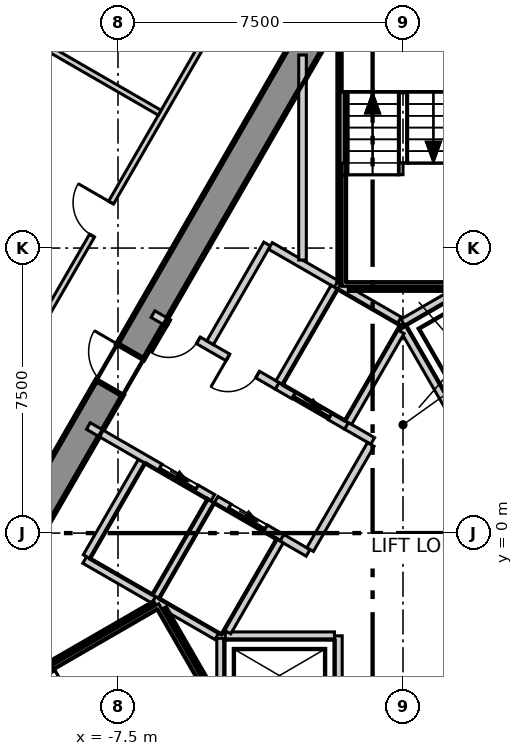
"""IFC4 building model, lengths in metres.
Left out: names, types, materials, properties, quantities, classifications, styles, units other than length and angle.
Written with IfcOpenShell. Run it as: python <this file> out.ifc"""

import sys

from ifc_helpers import new_model, si_unit, direction, frame, frame_2d, origin, place, context, subcontext, project, spatial, polyline, rectangle, outline, extrude, element, fill, save


model = new_model("IFC4")
c1 = context("Model", 3, precision=1e-05, world=origin(), true_north=direction((0.0, 1.0)))
c2 = subcontext(c1, "Body", "Model", "MODEL_VIEW")
j1 = project(units=[si_unit("LENGTHUNIT", "METRE"), si_unit("PLANEANGLEUNIT", "RADIAN")], contexts=[c1])
p1 = place(None, origin())
s1 = spatial("IfcSite", under=j1, at=p1, CompositionType="ELEMENT")
p2 = place(p1, origin())
s2 = spatial("IfcBuilding", under=s1, at=p2, CompositionType="ELEMENT")
p3 = place(p2, frame((0.0, 0.0, 176.3)))
s3 = spatial("IfcBuildingStorey", under=s2, at=p3, CompositionType="ELEMENT", Elevation=176.3)
p4 = place(p3, frame((-1.674, 14.3, -0.3), z_axis=(0.0, 0.0, 1.0), x_axis=(-0.499995765644, -0.866027848477, 0.0)))
e1 = element("IfcWall", 1, at=p4, inside=s3, PredefinedType="SHEAR", context=c2, shape_type="SweptSolid", body=[
    extrude(outline(polyline([(-0.231, -0.4), (1.732, -0.4), (3.695, -0.4), (5.658, -0.4), (7.621, -0.4), (9.584, -0.4), (11.547, -0.4), (13.51, -0.4), (15.473, -0.4), (17.436, -0.4), (19.399, -0.4), (21.362, -0.4), (23.325, -0.4), (22.863, 0.4), (20.977, 0.4), (19.091, 0.4), (17.205, 0.4), (15.319, 0.4), (13.433, 0.4), (11.547, 0.4), (9.661, 0.4), (7.775, 0.4), (5.889, 0.4), (4.003, 0.4), (2.117, 0.4), (0.231, 0.4), (-0.231, -0.4)])), origin(), (0.0, 0.0, 1.0), 4.2),
])
p5 = place(p4, frame((10.997, 0.0, 0.3)))
e2 = element("IfcOpeningElement", 2, at=p5, cuts=e1, PredefinedType="OPENING", context=c2, shape_type="SweptSolid", body=[
    extrude(rectangle(XDim=1.1, YDim=2.1, at=frame_2d((0.55, 1.05))), frame((0.0, 0.41, 0.0), z_axis=(0.0, -1.0, 0.0), x_axis=(1.0, 0.0, 0.0)), (0.0, 0.0, 1.0), 0.82),
])
p6 = place(p3, frame((-2.926, 32.654, 0.0), z_axis=(0.0, 0.0, 1.0), x_axis=(-0.499994049952, -0.866028839019, 0.0)))
e3 = element("IfcWall", 3, at=p6, inside=s3, PredefinedType="ELEMENTEDWALL", context=c2, shape_type="SweptSolid", body=[
    extrude(rectangle(XDim=53.613, YDim=0.2, at=frame_2d((26.806, 0.0))), origin(), (0.0, 0.0, 1.0), 3.9),
])
p7 = place(p6, frame((2.042, 0.0, 0.9)))
e4 = element("IfcOpeningElement", 4, at=p7, cuts=e3, PredefinedType="OPENING", context=c2, shape_type="SweptSolid", body=[
    extrude(rectangle(XDim=4.9, YDim=2.5, at=frame_2d((2.45, 1.25))), frame((0.0, 0.11, 0.0), z_axis=(0.0, -1.0, 0.0), x_axis=(1.0, 0.0, 0.0)), (0.0, 0.0, 1.0), 0.22),
])
p8 = place(p6, frame((8.42, 0.0, 0.9)))
e5 = element("IfcOpeningElement", 5, at=p8, cuts=e3, PredefinedType="OPENING", context=c2, shape_type="SweptSolid", body=[
    extrude(rectangle(XDim=4.9, YDim=2.5, at=frame_2d((2.45, 1.25))), frame((0.0, 0.11, 0.0), z_axis=(0.0, -1.0, 0.0), x_axis=(1.0, 0.0, 0.0)), (0.0, 0.0, 1.0), 0.22),
])
p9 = place(p6, frame((14.798, 0.0, 0.9)))
e6 = element("IfcOpeningElement", 6, at=p9, cuts=e3, PredefinedType="OPENING", context=c2, shape_type="SweptSolid", body=[
    extrude(rectangle(XDim=4.9, YDim=2.5, at=frame_2d((2.45, 1.25))), frame((0.0, 0.11, 0.0), z_axis=(0.0, -1.0, 0.0), x_axis=(1.0, 0.0, 0.0)), (0.0, 0.0, 1.0), 0.22),
])
p10 = place(p6, frame((21.177, 0.0, 0.9)))
e7 = element("IfcOpeningElement", 7, at=p10, cuts=e3, PredefinedType="OPENING", context=c2, shape_type="SweptSolid", body=[
    extrude(rectangle(XDim=4.9, YDim=2.5, at=frame_2d((2.45, 1.25))), frame((0.0, 0.11, 0.0), z_axis=(0.0, -1.0, 0.0), x_axis=(1.0, 0.0, 0.0)), (0.0, 0.0, 1.0), 0.22),
])
p11 = place(p6, frame((27.555, 0.0, 0.9)))
e8 = element("IfcOpeningElement", 8, at=p11, cuts=e3, PredefinedType="OPENING", context=c2, shape_type="SweptSolid", body=[
    extrude(rectangle(XDim=4.9, YDim=2.5, at=frame_2d((2.45, 1.25))), frame((0.0, 0.11, 0.0), z_axis=(0.0, -1.0, 0.0), x_axis=(1.0, 0.0, 0.0)), (0.0, 0.0, 1.0), 0.22),
])
p12 = place(p6, frame((33.934, 0.0, 0.9)))
e9 = element("IfcOpeningElement", 9, at=p12, cuts=e3, PredefinedType="OPENING", context=c2, shape_type="SweptSolid", body=[
    extrude(rectangle(XDim=4.9, YDim=2.5, at=frame_2d((2.45, 1.25))), frame((0.0, 0.11, 0.0), z_axis=(0.0, -1.0, 0.0), x_axis=(1.0, 0.0, 0.0)), (0.0, 0.0, 1.0), 0.22),
])
p13 = place(p6, frame((40.312, 0.0, 0.9)))
e10 = element("IfcOpeningElement", 10, at=p13, cuts=e3, PredefinedType="OPENING", context=c2, shape_type="SweptSolid", body=[
    extrude(rectangle(XDim=4.9, YDim=2.5, at=frame_2d((2.45, 1.25))), frame((0.0, 0.11, 0.0), z_axis=(0.0, -1.0, 0.0), x_axis=(1.0, 0.0, 0.0)), (0.0, 0.0, 1.0), 0.22),
])
p14 = place(p6, frame((46.69, 0.0, 0.9)))
e11 = element("IfcOpeningElement", 11, at=p14, cuts=e3, PredefinedType="OPENING", context=c2, shape_type="SweptSolid", body=[
    extrude(rectangle(XDim=4.9, YDim=2.5, at=frame_2d((2.45, 1.25))), frame((0.0, 0.11, 0.0), z_axis=(0.0, -1.0, 0.0), x_axis=(1.0, 0.0, 0.0)), (0.0, 0.0, 1.0), 0.22),
])
p15 = place(p3, frame((-15.993, -5.7, 0.0), z_axis=(0.0, 0.0, 1.0), x_axis=(0.500007877715, 0.866020855536, 0.0)))
e12 = element("IfcWall", 12, at=p15, inside=s3, PredefinedType="PARTITIONING", context=c2, shape_type="SweptSolid", body=[
    extrude(rectangle(XDim=25.865, YDim=0.15, at=frame_2d((12.933, 0.0))), origin(), (0.0, 0.0, 1.0), 3.9),
])
p16 = place(p15, frame((21.988, 0.0, 0.0)))
e13 = element("IfcOpeningElement", 13, at=p16, cuts=e12, PredefinedType="OPENING", context=c2, shape_type="SweptSolid", body=[
    extrude(rectangle(XDim=1.2, YDim=2.1, at=frame_2d((0.6, 1.05))), frame((0.0, 0.085, 0.0), z_axis=(0.0, -1.0, 0.0), x_axis=(1.0, 0.0, 0.0)), (0.0, 0.0, 1.0), 0.17),
])
p17 = place(p15, frame((15.622, 0.0, 0.0)))
e14 = element("IfcOpeningElement", 14, at=p17, cuts=e12, PredefinedType="OPENING", context=c2, shape_type="SweptSolid", body=[
    extrude(rectangle(XDim=1.0, YDim=2.1, at=frame_2d((0.5, 1.05))), frame((0.0, 0.085, 0.0), z_axis=(0.0, -1.0, 0.0), x_axis=(1.0, 0.0, 0.0)), (0.0, 0.0, 1.0), 0.17),
])
p18 = place(p15, frame((9.244, 0.0, 0.0)))
e15 = element("IfcOpeningElement", 15, at=p18, cuts=e12, PredefinedType="OPENING", context=c2, shape_type="SweptSolid", body=[
    extrude(rectangle(XDim=1.0, YDim=2.1, at=frame_2d((0.5, 1.05))), frame((0.0, 0.085, 0.0), z_axis=(0.0, -1.0, 0.0), x_axis=(1.0, 0.0, 0.0)), (0.0, 0.0, 1.0), 0.17),
])
p19 = place(p15, frame((2.678, 0.0, 0.0)))
e16 = element("IfcOpeningElement", 16, at=p19, cuts=e12, PredefinedType="OPENING", context=c2, shape_type="SweptSolid", body=[
    extrude(rectangle(XDim=1.2, YDim=2.1, at=frame_2d((0.6, 1.05))), frame((0.0, 0.085, 0.0), z_axis=(0.0, -1.0, 0.0), x_axis=(1.0, 0.0, 0.0)), (0.0, 0.0, 1.0), 0.17),
])
p20 = place(p3, frame((-13.145, 14.954, 0.0), z_axis=(0.0, 0.0, 1.0), x_axis=(0.866023191782, -0.500003831281, 0.0)))
e17 = element("IfcWall", 17, at=p20, inside=s3, PredefinedType="PARTITIONING", context=c2, shape_type="SweptSolid", body=[
    extrude(rectangle(XDim=7.786, YDim=0.15, at=frame_2d((3.893, 0.0))), origin(), (0.0, 0.0, 1.0), 3.9),
])
p21 = place(p3, frame((-8.376, -0.707, 0.0), z_axis=(0.0, 0.0, 1.0), x_axis=(0.866067520717, -0.499927044236, 0.0)))
e18 = element("IfcWall", 18, at=p21, inside=s3, PredefinedType="SOLIDWALL", context=c2, shape_type="SweptSolid", body=[
    extrude(rectangle(XDim=2.1, YDim=0.2, at=frame_2d((1.05, 0.0))), origin(), (0.0, 0.0, 1.0), 3.9),
])
p22 = place(p3, frame((-8.326, -0.62, 0.0), z_axis=(0.0, 0.0, 1.0), x_axis=(0.500023687443, 0.866011727401, 0.0)))
e19 = element("IfcWall", 19, at=p22, inside=s3, PredefinedType="SOLIDWALL", context=c2, shape_type="SweptSolid", body=[
    extrude(rectangle(XDim=2.9, YDim=0.2, at=frame_2d((1.45, 0.0))), origin(), (0.0, 0.0, 1.0), 3.9),
])
p23 = place(p3, frame((-4.8, -6.9, 0.0), z_axis=(0.0, 0.0, 1.0), x_axis=(0.0, 1.0, 0.0)))
e20 = element("IfcWall", 20, at=p23, inside=s3, PredefinedType="SOLIDWALL", context=c2, shape_type="SweptSolid", body=[
    extrude(rectangle(XDim=4.131, YDim=0.2, at=frame_2d((2.065, 0.0))), origin(), (0.0, 0.0, 1.0), 3.9),
])
p24 = place(p3, frame((-1.7, -8.58, 0.0), z_axis=(0.0, 0.0, 1.0), x_axis=(0.0, 1.0, 0.0)))
e21 = element("IfcWall", 21, at=p24, inside=s3, PredefinedType="SOLIDWALL", context=c2, shape_type="SweptSolid", body=[
    extrude(rectangle(XDim=5.877, YDim=0.2, at=frame_2d((2.938, 0.0))), origin(), (0.0, 0.0, 1.0), 3.9),
])
p25 = place(p24, frame((0.38, 0.0, 0.0)))
e22 = element("IfcOpeningElement", 22, at=p25, cuts=e21, PredefinedType="OPENING", context=c2, shape_type="SweptSolid", body=[
    extrude(rectangle(XDim=0.9, YDim=2.1, at=frame_2d((0.45, 1.05))), frame((0.0, 0.11, 0.0), z_axis=(0.0, -1.0, 0.0), x_axis=(1.0, 0.0, 0.0)), (0.0, 0.0, 1.0), 0.22),
])
p26 = place(p3, frame((-4.676, -2.7, 0.0), z_axis=(0.0, 0.0, 1.0), x_axis=(1.0, 0.0, 0.0)))
e23 = element("IfcWall", 23, at=p26, inside=s3, PredefinedType="SOLIDWALL", context=c2, shape_type="SweptSolid", body=[
    extrude(rectangle(XDim=2.873, YDim=0.2, at=frame_2d((1.437, 0.0))), origin(), (0.0, 0.0, 1.0), 3.9),
])
p27 = place(p3, frame((-0.002, 5.542, 0.0), z_axis=(0.0, 0.0, 1.0), x_axis=(0.866103910842, 0.499863997127, 0.0)))
e24 = element("IfcWall", 24, at=p27, inside=s3, PredefinedType="SOLIDWALL", context=c2, shape_type="SweptSolid", body=[
    extrude(rectangle(XDim=4.131, YDim=0.2, at=frame_2d((2.065, 0.0))), origin(), (0.0, 0.0, 1.0), 3.9),
])
p28 = place(p3, frame((0.0, 5.4, 0.0), z_axis=(0.0, 0.0, 1.0), x_axis=(0.500103862429, -0.865965430478, 0.0)))
e25 = element("IfcWall", 25, at=p28, inside=s3, PredefinedType="SOLIDWALL", context=c2, shape_type="SweptSolid", body=[
    extrude(rectangle(XDim=2.973, YDim=0.2, at=frame_2d((1.487, 0.0))), origin(), (0.0, 0.0, 1.0), 3.9),
])
p29 = place(p3, frame((-8.28, 2.818, 0.0), z_axis=(0.0, 0.0, 1.0), x_axis=(0.86600175068, -0.50004096614, 0.0)))
e26 = element("IfcWall", 26, at=p29, inside=s3, PredefinedType="SOLIDWALL", context=c2, shape_type="SweptSolid", body=[
    extrude(rectangle(XDim=3.782, YDim=0.2, at=frame_2d((1.891, 0.0))), origin(), (0.0, 0.0, 1.0), 3.9),
])
p30 = place(p29, frame((2.18, 0.0, 0.0)))
e27 = element("IfcOpeningElement", 27, at=p30, cuts=e26, PredefinedType="OPENING", context=c2, shape_type="SweptSolid", body=[
    extrude(rectangle(XDim=1.1, YDim=2.1, at=frame_2d((0.55, 1.05))), frame((0.0, 0.11, 0.0), z_axis=(0.0, -1.0, 0.0), x_axis=(1.0, 0.0, 0.0)), (0.0, 0.0, 1.0), 0.22),
])
p31 = place(p3, frame((-3.188, -0.122, 0.0), z_axis=(0.0, 0.0, 1.0), x_axis=(0.865705793592, -0.50055317294, 0.0)))
e28 = element("IfcWall", 28, at=p31, inside=s3, PredefinedType="SOLIDWALL", context=c2, shape_type="SweptSolid", body=[
    extrude(rectangle(XDim=0.797, YDim=0.2, at=frame_2d((0.398, 0.0))), origin(), (0.0, 0.0, 1.0), 3.9),
])
p32 = place(p3, frame((-6.58, 5.762, 0.0), z_axis=(0.0, 0.0, 1.0), x_axis=(0.866029704776, -0.49999255039, 0.0)))
e29 = element("IfcWall", 29, at=p32, inside=s3, PredefinedType="SOLIDWALL", context=c2, shape_type="SweptSolid", body=[
    extrude(rectangle(XDim=3.782, YDim=0.2, at=frame_2d((1.891, 0.0))), origin(), (0.0, 0.0, 1.0), 3.9),
])
p33 = place(p32, frame((2.279, 0.0, 0.0)))
e30 = element("IfcOpeningElement", 30, at=p33, cuts=e29, PredefinedType="OPENING", context=c2, shape_type="SweptSolid", body=[
    extrude(rectangle(XDim=0.9, YDim=2.1, at=frame_2d((0.45, 1.05))), frame((0.0, 0.11, 0.0), z_axis=(0.0, -1.0, 0.0), x_axis=(1.0, 0.0, 0.0)), (0.0, 0.0, 1.0), 0.22),
])
p34 = place(p32, frame((0.479, 0.0, 0.0)))
e31 = element("IfcOpeningElement", 31, at=p34, cuts=e29, PredefinedType="OPENING", context=c2, shape_type="SweptSolid", body=[
    extrude(rectangle(XDim=0.9, YDim=2.1, at=frame_2d((0.45, 1.05))), frame((0.0, 0.11, 0.0), z_axis=(0.0, -1.0, 0.0), x_axis=(1.0, 0.0, 0.0)), (0.0, 0.0, 1.0), 0.22),
])
p35 = place(p3, frame((-1.488, 2.822, 0.0), z_axis=(0.0, 0.0, 1.0), x_axis=(0.866236612152, -0.499633997809, 0.0)))
e32 = element("IfcWall", 32, at=p35, inside=s3, PredefinedType="SOLIDWALL", context=c2, shape_type="SweptSolid", body=[
    extrude(rectangle(XDim=0.796, YDim=0.2, at=frame_2d((0.398, 0.0))), origin(), (0.0, 0.0, 1.0), 3.9),
])
p36 = place(p3, frame((-5.076, 5.009, 0.0), z_axis=(0.0, 0.0, 1.0), x_axis=(0.50002537861, 0.866010750942, 0.0)))
e33 = element("IfcWall", 33, at=p36, inside=s3, PredefinedType="SOLIDWALL", context=c2, shape_type="SweptSolid", body=[
    extrude(rectangle(XDim=3.0, YDim=0.2, at=frame_2d((1.5, 0.0))), origin(), (0.0, 0.0, 1.0), 3.9),
])
p37 = place(p3, frame((-3.489, 7.557, 0.0), z_axis=(0.0, 0.0, 1.0), x_axis=(0.866010750942, -0.50002537861, 0.0)))
e34 = element("IfcWall", 34, at=p37, inside=s3, PredefinedType="SOLIDWALL", context=c2, shape_type="SweptSolid", body=[
    extrude(rectangle(XDim=2.0, YDim=0.2, at=frame_2d((1.0, 0.0))), origin(), (0.0, 0.0, 1.0), 3.9),
])
p38 = place(p3, frame((-2.444, -0.433, 0.0), z_axis=(0.0, 0.0, 1.0), x_axis=(0.500035624827, 0.866004834804, 0.0)))
e35 = element("IfcWall", 35, at=p38, inside=s3, PredefinedType="SOLIDWALL", context=c2, shape_type="SweptSolid", body=[
    extrude(rectangle(XDim=3.194, YDim=0.2, at=frame_2d((1.597, 0.0))), origin(), (0.0, 0.0, 1.0), 3.9),
])
p39 = place(p3, frame((-6.557, -1.757, 0.0), z_axis=(0.0, 0.0, 1.0), x_axis=(0.8659754619, -0.500086491905, 0.0)))
e36 = element("IfcWall", 36, at=p39, inside=s3, PredefinedType="SOLIDWALL", context=c2, shape_type="SweptSolid", body=[
    extrude(rectangle(XDim=1.916, YDim=0.2, at=frame_2d((0.958, 0.0))), origin(), (0.0, 0.0, 1.0), 3.9),
])
p40 = place(p3, frame((-6.507, -1.67, 0.0), z_axis=(0.0, 0.0, 1.0), x_axis=(0.50012328804, 0.865954211699, 0.0)))
e37 = element("IfcWall", 37, at=p40, inside=s3, PredefinedType="SOLIDWALL", context=c2, shape_type="SweptSolid", body=[
    extrude(rectangle(XDim=2.9, YDim=0.2, at=frame_2d((1.45, 0.0))), origin(), (0.0, 0.0, 1.0), 3.9),
])
p41 = place(p3, frame((-4.92, 0.878, 0.0), z_axis=(0.0, 0.0, 1.0), x_axis=(0.866010750942, -0.50002537861, 0.0)))
e38 = element("IfcWall", 38, at=p41, inside=s3, PredefinedType="SOLIDWALL", context=c2, shape_type="SweptSolid", body=[
    extrude(rectangle(XDim=2.0, YDim=0.2, at=frame_2d((1.0, 0.0))), origin(), (0.0, 0.0, 1.0), 3.9),
])
p42 = place(p41, frame((0.4, 0.0, 0.0)))
e39 = element("IfcOpeningElement", 39, at=p42, cuts=e38, PredefinedType="OPENING", context=c2, shape_type="SweptSolid", body=[
    extrude(rectangle(XDim=1.1, YDim=2.1, at=frame_2d((0.55, 1.05))), frame((0.0, 0.11, 0.0), z_axis=(0.0, -1.0, 0.0), x_axis=(1.0, 0.0, 0.0)), (0.0, 0.0, 1.0), 0.22),
])
p43 = place(p3, frame((-4.619, -2.6, 0.0), z_axis=(0.0, 0.0, 1.0), x_axis=(0.50009492287, 0.865970593103, 0.0)))
e40 = element("IfcWall", 40, at=p43, inside=s3, PredefinedType="SOLIDWALL", context=c2, shape_type="SweptSolid", body=[
    extrude(rectangle(XDim=2.761, YDim=0.2, at=frame_2d((1.381, 0.0))), origin(), (0.0, 0.0, 1.0), 3.9),
])
p44 = place(p3, frame((-3.309, 3.873, 0.0), z_axis=(0.0, 0.0, 1.0), x_axis=(0.866098583652, -0.499873227325, 0.0)))
e41 = element("IfcWall", 41, at=p44, inside=s3, PredefinedType="SOLIDWALL", context=c2, shape_type="SweptSolid", body=[
    extrude(rectangle(XDim=2.103, YDim=0.2, at=frame_2d((1.051, 0.0))), origin(), (0.0, 0.0, 1.0), 3.9),
])
p45 = place(p44, frame((0.502, 0.0, 0.0)))
e42 = element("IfcOpeningElement", 42, at=p45, cuts=e41, PredefinedType="OPENING", context=c2, shape_type="SweptSolid", body=[
    extrude(rectangle(XDim=1.1, YDim=2.1, at=frame_2d((0.55, 1.05))), frame((0.0, 0.11, 0.0), z_axis=(0.0, -1.0, 0.0), x_axis=(1.0, 0.0, 0.0)), (0.0, 0.0, 1.0), 0.22),
])
p46 = place(p3, frame((-3.257, 3.959, 0.0), z_axis=(0.0, 0.0, 1.0), x_axis=(0.50012328804, 0.865954211699, 0.0)))
e43 = element("IfcWall", 43, at=p46, inside=s3, PredefinedType="SOLIDWALL", context=c2, shape_type="SweptSolid", body=[
    extrude(rectangle(XDim=2.9, YDim=0.2, at=frame_2d((1.45, 0.0))), origin(), (0.0, 0.0, 1.0), 3.9),
])
p47 = place(p3, frame((-1.67, 6.507, 0.0), z_axis=(0.0, 0.0, 1.0), x_axis=(0.865941441609, -0.500145398563, 0.0)))
e44 = element("IfcWall", 44, at=p47, inside=s3, PredefinedType="SOLIDWALL", context=c2, shape_type="SweptSolid", body=[
    extrude(rectangle(XDim=1.815, YDim=0.2, at=frame_2d((0.908, 0.0))), origin(), (0.0, 0.0, 1.0), 3.9),
])
p48 = place(p3, frame((-1.438, 2.909, 0.0), z_axis=(0.0, 0.0, 1.0), x_axis=(0.499829630636, 0.866123744241, 0.0)))
e45 = element("IfcWall", 45, at=p48, inside=s3, PredefinedType="SOLIDWALL", context=c2, shape_type="SweptSolid", body=[
    extrude(rectangle(XDim=2.761, YDim=0.2, at=frame_2d((1.38, 0.0))), origin(), (0.0, 0.0, 1.0), 3.9),
])
p49 = place(p3, frame((-2.644, 7.185, 0.0), z_axis=(0.0, 0.0, 1.0), x_axis=(0.0, 1.0, 0.0)))
e46 = element("IfcWall", 46, at=p49, inside=s3, PredefinedType="SOLIDWALL", context=c2, shape_type="SweptSolid", body=[
    extrude(rectangle(XDim=5.395, YDim=0.2, at=frame_2d((2.698, 0.0))), origin(), (0.0, 0.0, 1.0), 3.35),
])
p50 = place(p3, frame((-13.167, -5.754, 0.0), z_axis=(0.0, 0.0, 1.0), x_axis=(0.866060938598, 0.499938446846, 0.0)))
e47 = element("IfcWall", 47, at=p50, inside=s3, PredefinedType="SOLIDWALL", context=c2, shape_type="SweptSolid", body=[
    extrude(rectangle(XDim=7.665, YDim=0.2, at=frame_2d((3.832, 0.0))), origin(), (0.0, 0.0, 1.0), 3.9),
])
p51 = place(p3, frame((-6.329, -2.038, 0.0), z_axis=(0.0, 0.0, 1.0), x_axis=(0.500200581029, -0.865909567298, 0.0)))
e48 = element("IfcWall", 48, at=p51, inside=s3, PredefinedType="SOLIDWALL", context=c2, shape_type="SweptSolid", body=[
    extrude(rectangle(XDim=2.799, YDim=0.2, at=frame_2d((1.399, 0.0))), origin(), (0.0, 0.0, 1.0), 3.9),
])
p52 = place(p3, frame((-1.4, 6.5, 0.0), z_axis=(0.0, 0.0, 1.0), x_axis=(1.0, 0.0, 0.0)))
e49 = element("IfcWall", 49, at=p52, inside=s3, PredefinedType="SOLIDWALL", context=c2, shape_type="SweptSolid", body=[
    extrude(rectangle(XDim=2.8, YDim=0.2, at=frame_2d((1.4, 0.0))), origin(), (0.0, 0.0, 1.0), 3.9),
])
p53 = place(p3, frame((-1.6, 6.615, 0.0), z_axis=(0.0, 0.0, 1.0), x_axis=(0.0, 1.0, 0.0)))
e50 = element("IfcWall", 50, at=p53, inside=s3, PredefinedType="SOLIDWALL", context=c2, shape_type="SweptSolid", body=[
    extrude(rectangle(XDim=7.665, YDim=0.2, at=frame_2d((3.833, 0.0))), origin(), (0.0, 0.0, 1.0), 3.9),
])
p54 = place(p42, origin())
e51 = element("IfcDoor", 51, at=p54, inside=s3, OperationType="SLIDING_TO_LEFT", PredefinedType="DOOR", context=c2, shape_type="SweptSolid", body=[
    extrude(rectangle(XDim=1.1, YDim=2.1, at=frame_2d((0.55, 1.05))), frame((0.0, 0.025, 0.0), z_axis=(0.0, -1.0, 0.0), x_axis=(1.0, 0.0, 0.0)), (0.0, 0.0, 1.0), 0.05),
])
fill(e39, e51)
p55 = place(p45, origin())
e52 = element("IfcDoor", 52, at=p55, inside=s3, OperationType="SLIDING_TO_LEFT", PredefinedType="DOOR", context=c2, shape_type="SweptSolid", body=[
    extrude(rectangle(XDim=1.1, YDim=2.1, at=frame_2d((0.55, 1.05))), frame((0.0, 0.025, 0.0), z_axis=(0.0, -1.0, 0.0), x_axis=(1.0, 0.0, 0.0)), (0.0, 0.0, 1.0), 0.05),
])
fill(e42, e52)
p56 = place(p30, origin())
e53 = element("IfcDoor", 53, at=p56, inside=s3, OperationType="SLIDING_TO_LEFT", PredefinedType="DOOR", context=c2, shape_type="SweptSolid", body=[
    extrude(rectangle(XDim=1.1, YDim=2.1, at=frame_2d((0.55, 1.05))), frame((0.0, 0.025, 0.0), z_axis=(0.0, -1.0, 0.0), x_axis=(1.0, 0.0, 0.0)), (0.0, 0.0, 1.0), 0.05),
])
fill(e27, e53)
p57 = place(p33, origin())
e54 = element("IfcDoor", 54, at=p57, inside=s3, OperationType="SINGLE_SWING_LEFT", PredefinedType="DOOR", context=c2, shape_type="SweptSolid", body=[
    extrude(rectangle(XDim=0.9, YDim=2.1, at=frame_2d((0.45, 1.05))), frame((0.0, 0.025, 0.0), z_axis=(0.0, -1.0, 0.0), x_axis=(1.0, 0.0, 0.0)), (0.0, 0.0, 1.0), 0.05),
])
fill(e30, e54)
p58 = place(p17, origin())
e55 = element("IfcDoor", 55, at=p58, inside=s3, OperationType="SINGLE_SWING_LEFT", PredefinedType="DOOR", context=c2, shape_type="SweptSolid", body=[
    extrude(rectangle(XDim=1.0, YDim=2.1, at=frame_2d((0.5, 1.05))), frame((0.0, 0.025, 0.0), z_axis=(0.0, -1.0, 0.0), x_axis=(1.0, 0.0, 0.0)), (0.0, 0.0, 1.0), 0.05),
])
fill(e14, e55)
p59 = place(p5, origin())
e56 = element("IfcDoor", 56, at=p59, inside=s3, OperationType="SINGLE_SWING_LEFT", PredefinedType="DOOR", context=c2, shape_type="SweptSolid", body=[
    extrude(rectangle(XDim=1.1, YDim=2.1, at=frame_2d((0.55, 1.05))), frame((0.0, 0.025, 0.0), z_axis=(0.0, -1.0, 0.0), x_axis=(1.0, 0.0, 0.0)), (0.0, 0.0, 1.0), 0.05),
])
fill(e2, e56)
p60 = place(p34, origin())
e57 = element("IfcDoor", 57, at=p60, inside=s3, OperationType="SINGLE_SWING_LEFT", PredefinedType="DOOR", context=c2, shape_type="SweptSolid", body=[
    extrude(rectangle(XDim=0.9, YDim=2.1, at=frame_2d((0.45, 1.05))), frame((0.0, 0.025, 0.0), z_axis=(0.0, -1.0, 0.0), x_axis=(1.0, 0.0, 0.0)), (0.0, 0.0, 1.0), 0.05),
])
fill(e31, e57)
save(model, sys.argv[1])
